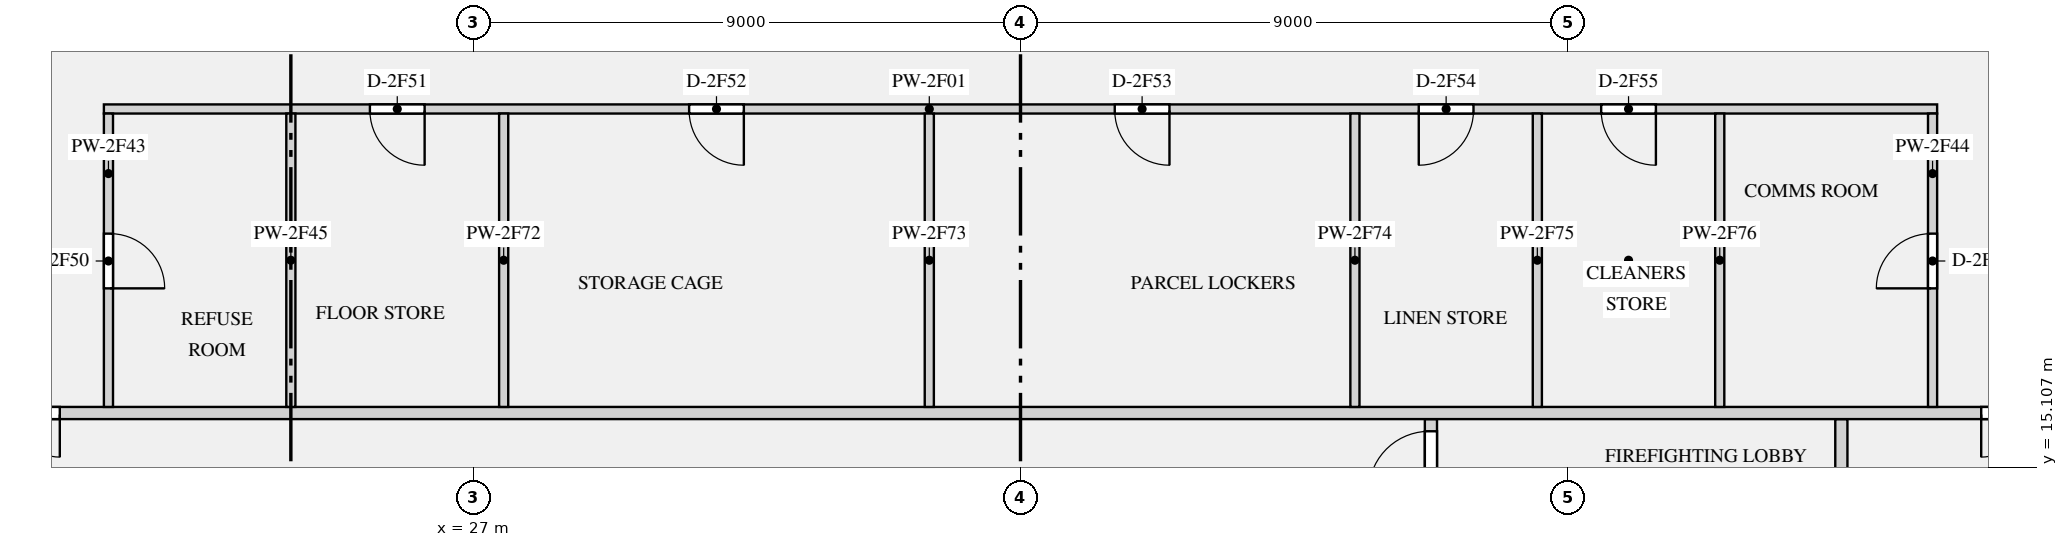
"""IFC4 building model, lengths in metres.
Left out: names, types, materials, properties, quantities, classifications, styles, units other than length and angle.
Written with IfcOpenShell. Run it as: python <this file> out.ifc"""

import sys

from ifc_helpers import new_model, si_unit, direction, frame, frame_2d, origin, place, context, subcontext, project, spatial, rectangle, extrude, element, fill, save


model = new_model("IFC4")
c1 = context("Model", 3, precision=1e-05, world=origin(), true_north=direction((0.0, 1.0)))
c2 = subcontext(c1, "Body", "Model", "MODEL_VIEW")
j1 = project(units=[si_unit("LENGTHUNIT", "METRE"), si_unit("PLANEANGLEUNIT", "RADIAN")], contexts=[c1])
p1 = place(None, origin())
s1 = spatial("IfcSite", under=j1, at=p1, CompositionType="ELEMENT")
p2 = place(p1, origin())
s2 = spatial("IfcBuilding", under=s1, at=p2, CompositionType="ELEMENT")
p3 = place(p2, frame((0.0, 0.0, 127.65)))
s3 = spatial("IfcBuildingStorey", under=s2, at=p3, CompositionType="ELEMENT", Elevation=127.65)
p4 = place(p3, frame((49.5, 12.5, 0.0), z_axis=(0.0, 0.0, 1.0), x_axis=(0.0, 1.0, 0.0)))
e1 = element("IfcWall", 1, at=p4, inside=s3, PredefinedType="PARTITIONING", context=c2, shape_type="SweptSolid", body=[
    extrude(rectangle(XDim=3.4, YDim=0.2, at=frame_2d((1.7, 0.0))), origin(), (0.0, 0.0, 1.0), 2.65),
])
p5 = place(p4, frame((1.15, 0.0, 0.0)))
e2 = element("IfcOpeningElement", 2, at=p5, cuts=e1, PredefinedType="OPENING", context=c2, shape_type="SweptSolid", body=[
    extrude(rectangle(XDim=1.1, YDim=2.1, at=frame_2d((0.55, 1.05))), frame((0.0, 0.11, 0.0), z_axis=(0.0, -1.0, 0.0), x_axis=(1.0, 0.0, 0.0)), (0.0, 0.0, 1.0), 0.22),
])
p6 = place(p3, frame((42.75, 14.575, 0.0), z_axis=(0.0, 0.0, 1.0), x_axis=(0.0, 1.0, 0.0)))
e3 = element("IfcWall", 3, at=p6, inside=s3, PredefinedType="PARTITIONING", context=c2, shape_type="SweptSolid", body=[
    extrude(rectangle(XDim=1.325, YDim=0.2, at=frame_2d((0.663, 0.0))), origin(), (0.0, 0.0, 1.0), 2.65),
])
p7 = place(p6, frame((0.125, 0.0, 0.0)))
e4 = element("IfcOpeningElement", 4, at=p7, cuts=e3, PredefinedType="OPENING", context=c2, shape_type="SweptSolid", body=[
    extrude(rectangle(XDim=1.0, YDim=2.1, at=frame_2d((0.5, 1.05))), frame((0.0, 0.11, 0.0), z_axis=(0.0, -1.0, 0.0), x_axis=(1.0, 0.0, 0.0)), (0.0, 0.0, 1.0), 0.22),
])
p8 = place(p3, frame((20.925, 21.0, 0.0), z_axis=(0.0, 0.0, 1.0), x_axis=(1.0, 0.0, 0.0)))
e5 = element("IfcWall", 5, at=p8, inside=s3, PredefinedType="PARTITIONING", context=c2, shape_type="SweptSolid", body=[
    extrude(rectangle(XDim=30.15, YDim=0.15, at=frame_2d((15.075, 0.0))), origin(), (0.0, 0.0, 1.0), 2.65),
])
p9 = place(p8, frame((4.375, 0.0, 0.0)))
e6 = element("IfcOpeningElement", 6, at=p9, cuts=e5, PredefinedType="OPENING", context=c2, shape_type="SweptSolid", body=[
    extrude(rectangle(XDim=0.9, YDim=2.1, at=frame_2d((0.45, 1.05))), frame((0.0, 0.085, 0.0), z_axis=(0.0, -1.0, 0.0), x_axis=(1.0, 0.0, 0.0)), (0.0, 0.0, 1.0), 0.17),
])
p10 = place(p8, frame((9.625, 0.0, 0.0)))
e7 = element("IfcOpeningElement", 7, at=p10, cuts=e5, PredefinedType="OPENING", context=c2, shape_type="SweptSolid", body=[
    extrude(rectangle(XDim=0.9, YDim=2.1, at=frame_2d((0.45, 1.05))), frame((0.0, 0.085, 0.0), z_axis=(0.0, -1.0, 0.0), x_axis=(1.0, 0.0, 0.0)), (0.0, 0.0, 1.0), 0.17),
])
p11 = place(p8, frame((16.625, 0.0, 0.0)))
e8 = element("IfcOpeningElement", 8, at=p11, cuts=e5, PredefinedType="OPENING", context=c2, shape_type="SweptSolid", body=[
    extrude(rectangle(XDim=0.9, YDim=2.1, at=frame_2d((0.45, 1.05))), frame((0.0, 0.085, 0.0), z_axis=(0.0, -1.0, 0.0), x_axis=(1.0, 0.0, 0.0)), (0.0, 0.0, 1.0), 0.17),
])
p12 = place(p8, frame((21.625, 0.0, 0.0)))
e9 = element("IfcOpeningElement", 9, at=p12, cuts=e5, PredefinedType="OPENING", context=c2, shape_type="SweptSolid", body=[
    extrude(rectangle(XDim=0.9, YDim=2.1, at=frame_2d((0.45, 1.05))), frame((0.0, 0.085, 0.0), z_axis=(0.0, -1.0, 0.0), x_axis=(1.0, 0.0, 0.0)), (0.0, 0.0, 1.0), 0.17),
])
p13 = place(p8, frame((24.625, 0.0, 0.0)))
e10 = element("IfcOpeningElement", 10, at=p13, cuts=e5, PredefinedType="OPENING", context=c2, shape_type="SweptSolid", body=[
    extrude(rectangle(XDim=0.9, YDim=2.1, at=frame_2d((0.45, 1.05))), frame((0.0, 0.085, 0.0), z_axis=(0.0, -1.0, 0.0), x_axis=(1.0, 0.0, 0.0)), (0.0, 0.0, 1.0), 0.17),
])
p14 = place(p3, frame((17.9, 16.0, 0.0), z_axis=(0.0, 0.0, 1.0), x_axis=(1.0, 0.0, 0.0)))
e11 = element("IfcWall", 11, at=p14, inside=s3, PredefinedType="PARTITIONING", context=c2, shape_type="SweptSolid", body=[
    extrude(rectangle(XDim=36.2, YDim=0.2, at=frame_2d((18.1, 0.0))), origin(), (0.0, 0.0, 1.0), 2.65),
])
p15 = place(p14, frame((0.9, 0.0, 0.0)))
e12 = element("IfcOpeningElement", 12, at=p15, cuts=e11, PredefinedType="OPENING", context=c2, shape_type="SweptSolid", body=[
    extrude(rectangle(XDim=1.4, YDim=2.1, at=frame_2d((0.7, 1.05))), frame((0.0, 0.11, 0.0), z_axis=(0.0, -1.0, 0.0), x_axis=(1.0, 0.0, 0.0)), (0.0, 0.0, 1.0), 0.22),
])
p16 = place(p14, frame((33.9, 0.0, 0.0)))
e13 = element("IfcOpeningElement", 13, at=p16, cuts=e11, PredefinedType="OPENING", context=c2, shape_type="SweptSolid", body=[
    extrude(rectangle(XDim=1.4, YDim=2.1, at=frame_2d((0.7, 1.05))), frame((0.0, 0.11, 0.0), z_axis=(0.0, -1.0, 0.0), x_axis=(1.0, 0.0, 0.0)), (0.0, 0.0, 1.0), 0.22),
])
p17 = place(p3, frame((21.0, 16.1, 0.0), z_axis=(0.0, 0.0, 1.0), x_axis=(0.0, 1.0, 0.0)))
e14 = element("IfcWall", 14, at=p17, inside=s3, PredefinedType="PARTITIONING", context=c2, shape_type="SweptSolid", body=[
    extrude(rectangle(XDim=4.825, YDim=0.15, at=frame_2d((2.413, 0.0))), origin(), (0.0, 0.0, 1.0), 2.65),
])
p18 = place(p17, frame((1.95, 0.0, 0.0)))
e15 = element("IfcOpeningElement", 15, at=p18, cuts=e14, PredefinedType="OPENING", context=c2, shape_type="SweptSolid", body=[
    extrude(rectangle(XDim=0.9, YDim=2.1, at=frame_2d((0.45, 1.05))), frame((0.0, 0.085, 0.0), z_axis=(0.0, -1.0, 0.0), x_axis=(1.0, 0.0, 0.0)), (0.0, 0.0, 1.0), 0.17),
])
p19 = place(p3, frame((51.0, 16.1, 0.0), z_axis=(0.0, 0.0, 1.0), x_axis=(0.0, 1.0, 0.0)))
e16 = element("IfcWall", 16, at=p19, inside=s3, PredefinedType="PARTITIONING", context=c2, shape_type="SweptSolid", body=[
    extrude(rectangle(XDim=4.825, YDim=0.15, at=frame_2d((2.413, 0.0))), origin(), (0.0, 0.0, 1.0), 2.65),
])
p20 = place(p19, frame((1.95, 0.0, 0.0)))
e17 = element("IfcOpeningElement", 17, at=p20, cuts=e16, PredefinedType="OPENING", context=c2, shape_type="SweptSolid", body=[
    extrude(rectangle(XDim=0.9, YDim=2.1, at=frame_2d((0.45, 1.05))), frame((0.0, 0.085, 0.0), z_axis=(0.0, -1.0, 0.0), x_axis=(1.0, 0.0, 0.0)), (0.0, 0.0, 1.0), 0.17),
])
for number, where, z_axis, x_axis in (
    (18, (24.0, 16.1, 0.0), (0.0, 0.0, 1.0), (0.0, 1.0, 0.0)),
    (19, (27.5, 16.1, 0.0), (0.0, 0.0, 1.0), (0.0, 1.0, 0.0)),
    (20, (34.5, 16.1, 0.0), (0.0, 0.0, 1.0), (0.0, 1.0, 0.0)),
    (21, (41.5, 16.1, 0.0), (0.0, 0.0, 1.0), (0.0, 1.0, 0.0)),
    (22, (44.5, 16.1, 0.0), (0.0, 0.0, 1.0), (0.0, 1.0, 0.0)),
    (23, (47.5, 16.1, 0.0), (0.0, 0.0, 1.0), (0.0, 1.0, 0.0)),
):
    element("IfcWall", number, at=place(p3, frame(where, z_axis=z_axis, x_axis=x_axis)), inside=s3, PredefinedType="PARTITIONING", context=c2, shape_type="SweptSolid", body=[
        extrude(rectangle(XDim=4.825, YDim=0.15, at=frame_2d((2.413, 0.0))), origin(), (0.0, 0.0, 1.0), 2.65),
    ])
p21 = place(p7, origin())
e24 = element("IfcDoor", 24, at=p21, inside=s3, OperationType="SINGLE_SWING_LEFT", PredefinedType="DOOR", context=c2, shape_type="SweptSolid", body=[
    extrude(rectangle(XDim=1.0, YDim=2.1, at=frame_2d((0.5, 1.05))), frame((0.0, 0.025, 0.0), z_axis=(0.0, -1.0, 0.0), x_axis=(1.0, 0.0, 0.0)), (0.0, 0.0, 1.0), 0.05),
])
fill(e4, e24)
p22 = place(p15, frame((1.4, 0.0, 0.0), z_axis=(0.0, 0.0, 1.0), x_axis=(-1.0, 0.0, 0.0)))
e25 = element("IfcDoor", 25, at=p22, inside=s3, OperationType="DOUBLE_DOOR_SINGLE_SWING", PredefinedType="DOOR", context=c2, shape_type="SweptSolid", body=[
    extrude(rectangle(XDim=1.4, YDim=2.1, at=frame_2d((0.7, 1.05))), frame((0.0, 0.025, 0.0), z_axis=(0.0, -1.0, 0.0), x_axis=(1.0, 0.0, 0.0)), (0.0, 0.0, 1.0), 0.05),
])
fill(e12, e25)
p23 = place(p16, frame((1.4, 0.0, 0.0), z_axis=(0.0, 0.0, 1.0), x_axis=(-1.0, 0.0, 0.0)))
e26 = element("IfcDoor", 26, at=p23, inside=s3, OperationType="DOUBLE_DOOR_SINGLE_SWING", PredefinedType="DOOR", context=c2, shape_type="SweptSolid", body=[
    extrude(rectangle(XDim=1.4, YDim=2.1, at=frame_2d((0.7, 1.05))), frame((0.0, 0.025, 0.0), z_axis=(0.0, -1.0, 0.0), x_axis=(1.0, 0.0, 0.0)), (0.0, 0.0, 1.0), 0.05),
])
fill(e13, e26)
p24 = place(p18, frame((0.9, 0.0, 0.0), z_axis=(0.0, 0.0, 1.0), x_axis=(-1.0, 0.0, 0.0)))
e27 = element("IfcDoor", 27, at=p24, inside=s3, OperationType="SINGLE_SWING_RIGHT", PredefinedType="DOOR", context=c2, shape_type="SweptSolid", body=[
    extrude(rectangle(XDim=0.9, YDim=2.1, at=frame_2d((0.45, 1.05))), frame((0.0, 0.025, 0.0), z_axis=(0.0, -1.0, 0.0), x_axis=(1.0, 0.0, 0.0)), (0.0, 0.0, 1.0), 0.05),
])
fill(e15, e27)
p25 = place(p9, frame((0.9, 0.0, 0.0), z_axis=(0.0, 0.0, 1.0), x_axis=(-1.0, 0.0, 0.0)))
e28 = element("IfcDoor", 28, at=p25, inside=s3, OperationType="SINGLE_SWING_LEFT", PredefinedType="DOOR", context=c2, shape_type="SweptSolid", body=[
    extrude(rectangle(XDim=0.9, YDim=2.1, at=frame_2d((0.45, 1.05))), frame((0.0, 0.025, 0.0), z_axis=(0.0, -1.0, 0.0), x_axis=(1.0, 0.0, 0.0)), (0.0, 0.0, 1.0), 0.05),
])
fill(e6, e28)
p26 = place(p10, frame((0.9, 0.0, 0.0), z_axis=(0.0, 0.0, 1.0), x_axis=(-1.0, 0.0, 0.0)))
e29 = element("IfcDoor", 29, at=p26, inside=s3, OperationType="SINGLE_SWING_LEFT", PredefinedType="DOOR", context=c2, shape_type="SweptSolid", body=[
    extrude(rectangle(XDim=0.9, YDim=2.1, at=frame_2d((0.45, 1.05))), frame((0.0, 0.025, 0.0), z_axis=(0.0, -1.0, 0.0), x_axis=(1.0, 0.0, 0.0)), (0.0, 0.0, 1.0), 0.05),
])
fill(e7, e29)
p27 = place(p11, frame((0.9, 0.0, 0.0), z_axis=(0.0, 0.0, 1.0), x_axis=(-1.0, 0.0, 0.0)))
e30 = element("IfcDoor", 30, at=p27, inside=s3, OperationType="SINGLE_SWING_LEFT", PredefinedType="DOOR", context=c2, shape_type="SweptSolid", body=[
    extrude(rectangle(XDim=0.9, YDim=2.1, at=frame_2d((0.45, 1.05))), frame((0.0, 0.025, 0.0), z_axis=(0.0, -1.0, 0.0), x_axis=(1.0, 0.0, 0.0)), (0.0, 0.0, 1.0), 0.05),
])
fill(e8, e30)
p28 = place(p12, frame((0.9, 0.0, 0.0), z_axis=(0.0, 0.0, 1.0), x_axis=(-1.0, 0.0, 0.0)))
e31 = element("IfcDoor", 31, at=p28, inside=s3, OperationType="SINGLE_SWING_RIGHT", PredefinedType="DOOR", context=c2, shape_type="SweptSolid", body=[
    extrude(rectangle(XDim=0.9, YDim=2.1, at=frame_2d((0.45, 1.05))), frame((0.0, 0.025, 0.0), z_axis=(0.0, -1.0, 0.0), x_axis=(1.0, 0.0, 0.0)), (0.0, 0.0, 1.0), 0.05),
])
fill(e9, e31)
p29 = place(p13, frame((0.9, 0.0, 0.0), z_axis=(0.0, 0.0, 1.0), x_axis=(-1.0, 0.0, 0.0)))
e32 = element("IfcDoor", 32, at=p29, inside=s3, OperationType="SINGLE_SWING_LEFT", PredefinedType="DOOR", context=c2, shape_type="SweptSolid", body=[
    extrude(rectangle(XDim=0.9, YDim=2.1, at=frame_2d((0.45, 1.05))), frame((0.0, 0.025, 0.0), z_axis=(0.0, -1.0, 0.0), x_axis=(1.0, 0.0, 0.0)), (0.0, 0.0, 1.0), 0.05),
])
fill(e10, e32)
p30 = place(p20, origin())
e33 = element("IfcDoor", 33, at=p30, inside=s3, OperationType="SINGLE_SWING_LEFT", PredefinedType="DOOR", context=c2, shape_type="SweptSolid", body=[
    extrude(rectangle(XDim=0.9, YDim=2.1, at=frame_2d((0.45, 1.05))), frame((0.0, 0.025, 0.0), z_axis=(0.0, -1.0, 0.0), x_axis=(1.0, 0.0, 0.0)), (0.0, 0.0, 1.0), 0.05),
])
fill(e17, e33)
save(model, sys.argv[1])
